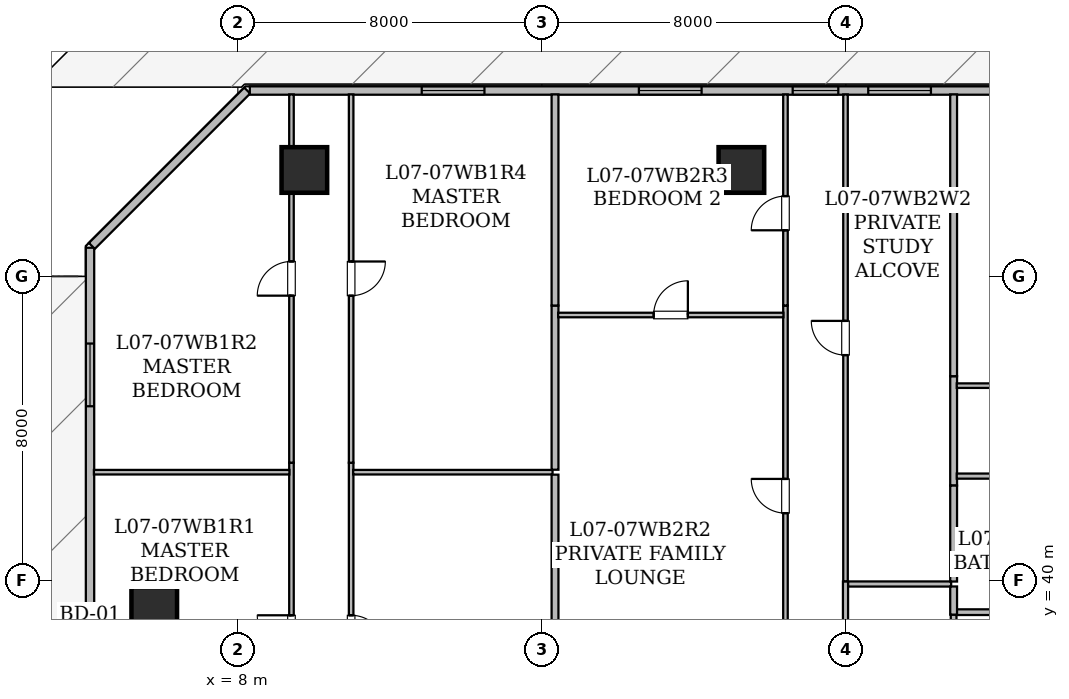
"""IFC4 building model, lengths in metres.
Left out: names, types, materials, properties, quantities, classifications, styles, units other than length and angle.
Written with IfcOpenShell. Run it as: python <this file> out.ifc"""

import sys

from ifc_helpers import new_model, si_unit, direction, frame, frame_2d, origin, origin_2d, place, context, subcontext, project, spatial, rectangle, hollow_rectangle, extrude, element, fill, save


model = new_model("IFC4")
c1 = context("Model", 3, precision=1e-05, world=origin(), true_north=direction((0.0, 1.0)))
c2 = subcontext(c1, "Body", "Model", "MODEL_VIEW")
j1 = project(units=[si_unit("LENGTHUNIT", "METRE"), si_unit("PLANEANGLEUNIT", "RADIAN")], contexts=[c1])
p1 = place(None, origin())
s1 = spatial("IfcSite", under=j1, at=p1, CompositionType="ELEMENT")
p2 = place(p1, origin())
s2 = spatial("IfcBuilding", under=s1, at=p2, CompositionType="ELEMENT")
p3 = place(p2, frame((0.0, 0.0, 33.3)))
s3 = spatial("IfcBuildingStorey", under=s2, at=p3, CompositionType="ELEMENT", Elevation=33.3)
for number, where, z_axis, x_axis in (
    (1, (9.75, 50.8, 0.025), (0.0, 0.0, 1.0), (1.0, 0.0, 0.0)),
    (2, (21.25, 50.8, 0.025), (0.0, 0.0, 1.0), (1.0, 0.0, 0.0)),
    (3, (5.8, 39.225, 0.025), (0.0, 0.0, 1.0), (1.0, 0.0, 0.0)),
):
    element("IfcColumn", number, at=place(p3, frame(where, z_axis=z_axis, x_axis=x_axis)), inside=s3, PredefinedType="COLUMN", context=c2, shape_type="SweptSolid", body=[
        extrude(hollow_rectangle(XDim=1.2, YDim=1.2, WallThickness=0.06, at=origin_2d()), origin(), (0.0, 0.0, 1.0), 3.625),
    ])
p4 = place(p3, frame((4.11, 31.295, 0.0), z_axis=(0.0, 0.0, 1.0), x_axis=(0.0, 1.0, 0.0)))
e4 = element("IfcWall", 4, at=p4, inside=s3, PredefinedType="STANDARD", context=c2, shape_type="SweptSolid", body=[
    extrude(rectangle(XDim=17.459, YDim=0.22, at=frame_2d((8.729, 0.0))), origin(), (0.0, 0.0, 1.0), 3.43),
])
p5 = place(p4, frame((5.203, 0.0, 0.0)))
e5 = element("IfcOpeningElement", 5, at=p5, cuts=e4, PredefinedType="OPENING", context=c2, shape_type="SweptSolid", body=[
    extrude(rectangle(XDim=1.1, YDim=2.2, at=frame_2d((0.55, 1.1))), frame((0.0, 0.12, 0.0), z_axis=(0.0, -1.0, 0.0), x_axis=(1.0, 0.0, 0.0)), (0.0, 0.0, 1.0), 0.24),
])
p6 = place(p4, frame((1.058, 0.0, 0.85)))
e6 = element("IfcOpeningElement", 6, at=p6, cuts=e4, PredefinedType="OPENING", context=c2, shape_type="SweptSolid", body=[
    extrude(rectangle(XDim=1.65, YDim=1.55, at=frame_2d((0.825, 0.775))), frame((0.0, 0.12, 0.0), z_axis=(0.0, -1.0, 0.0), x_axis=(1.0, 0.0, 0.0)), (0.0, 0.0, 1.0), 0.24),
])
p7 = place(p4, frame((13.288, 0.0, 0.85)))
e7 = element("IfcOpeningElement", 7, at=p7, cuts=e4, PredefinedType="OPENING", context=c2, shape_type="SweptSolid", body=[
    extrude(rectangle(XDim=1.65, YDim=1.55, at=frame_2d((0.825, 0.775))), frame((0.0, 0.12, 0.0), z_axis=(0.0, -1.0, 0.0), x_axis=(1.0, 0.0, 0.0)), (0.0, 0.0, 1.0), 0.24),
])
p8 = place(p3, frame((4.158, 48.802, 0.0), z_axis=(0.0, 0.0, 1.0), x_axis=(0.70712789547, 0.707085666273, 0.0)))
e8 = element("IfcWall", 8, at=p8, inside=s3, PredefinedType="STANDARD", context=c2, shape_type="SweptSolid", body=[
    extrude(rectangle(XDim=5.781, YDim=0.22, at=frame_2d((2.891, 0.0))), origin(), (0.0, 0.0, 1.0), 3.43),
])
p9 = place(p3, frame((8.315, 52.89, 0.0), z_axis=(0.0, 0.0, 1.0), x_axis=(1.0, 0.0, 0.0)))
e9 = element("IfcWall", 9, at=p9, inside=s3, PredefinedType="STANDARD", context=c2, shape_type="SweptSolid", body=[
    extrude(rectangle(XDim=37.439, YDim=0.22, at=frame_2d((18.719, 0.0))), origin(), (0.0, 0.0, 1.0), 3.43),
])
p10 = place(p9, frame((19.779, 0.0, 0.0)))
e10 = element("IfcOpeningElement", 10, at=p10, cuts=e9, PredefinedType="OPENING", context=c2, shape_type="SweptSolid", body=[
    extrude(rectangle(XDim=1.0, YDim=2.15, at=frame_2d((0.5, 1.075))), frame((0.0, 0.12, 0.0), z_axis=(0.0, -1.0, 0.0), x_axis=(1.0, 0.0, 0.0)), (0.0, 0.0, 1.0), 0.24),
])
p11 = place(p9, frame((4.524, 0.0, 0.85)))
e11 = element("IfcOpeningElement", 11, at=p11, cuts=e9, PredefinedType="OPENING", context=c2, shape_type="SweptSolid", body=[
    extrude(rectangle(XDim=1.65, YDim=1.55, at=frame_2d((0.825, 0.775))), frame((0.0, 0.12, 0.0), z_axis=(0.0, -1.0, 0.0), x_axis=(1.0, 0.0, 0.0)), (0.0, 0.0, 1.0), 0.24),
])
p12 = place(p9, frame((16.273, 0.0, 0.85)))
e12 = element("IfcOpeningElement", 12, at=p12, cuts=e9, PredefinedType="OPENING", context=c2, shape_type="SweptSolid", body=[
    extrude(rectangle(XDim=1.65, YDim=1.55, at=frame_2d((0.825, 0.775))), frame((0.0, 0.12, 0.0), z_axis=(0.0, -1.0, 0.0), x_axis=(1.0, 0.0, 0.0)), (0.0, 0.0, 1.0), 0.24),
])
p13 = place(p9, frame((14.285, 0.0, 0.8)))
e13 = element("IfcOpeningElement", 13, at=p13, cuts=e9, PredefinedType="OPENING", context=c2, shape_type="SweptSolid", body=[
    extrude(rectangle(XDim=1.2, YDim=1.5, at=frame_2d((0.6, 0.75))), frame((0.0, 0.12, 0.0), z_axis=(0.0, -1.0, 0.0), x_axis=(1.0, 0.0, 0.0)), (0.0, 0.0, 1.0), 0.24),
])
p14 = place(p9, frame((10.238, 0.0, 0.85)))
e14 = element("IfcOpeningElement", 14, at=p14, cuts=e9, PredefinedType="OPENING", context=c2, shape_type="SweptSolid", body=[
    extrude(rectangle(XDim=1.65, YDim=1.55, at=frame_2d((0.825, 0.775))), frame((0.0, 0.12, 0.0), z_axis=(0.0, -1.0, 0.0), x_axis=(1.0, 0.0, 0.0)), (0.0, 0.0, 1.0), 0.24),
])
p15 = place(p9, frame((25.185, 0.0, 0.8)))
e15 = element("IfcOpeningElement", 15, at=p15, cuts=e9, PredefinedType="OPENING", context=c2, shape_type="SweptSolid", body=[
    extrude(rectangle(XDim=1.2, YDim=1.5, at=frame_2d((0.6, 0.75))), frame((0.0, 0.12, 0.0), z_axis=(0.0, -1.0, 0.0), x_axis=(1.0, 0.0, 0.0)), (0.0, 0.0, 1.0), 0.24),
])
p16 = place(p9, frame((28.985, 0.0, 0.85)))
e16 = element("IfcOpeningElement", 16, at=p16, cuts=e9, PredefinedType="OPENING", context=c2, shape_type="SweptSolid", body=[
    extrude(rectangle(XDim=1.65, YDim=1.55, at=frame_2d((0.825, 0.775))), frame((0.0, 0.12, 0.0), z_axis=(0.0, -1.0, 0.0), x_axis=(1.0, 0.0, 0.0)), (0.0, 0.0, 1.0), 0.24),
])
p17 = place(p9, frame((33.49, 0.0, 0.85)))
e17 = element("IfcOpeningElement", 17, at=p17, cuts=e9, PredefinedType="OPENING", context=c2, shape_type="SweptSolid", body=[
    extrude(rectangle(XDim=1.65, YDim=1.55, at=frame_2d((0.825, 0.775))), frame((0.0, 0.12, 0.0), z_axis=(0.0, -1.0, 0.0), x_axis=(1.0, 0.0, 0.0)), (0.0, 0.0, 1.0), 0.24),
])
p18 = place(p9, frame((35.942, 0.0, 0.85)))
e18 = element("IfcOpeningElement", 18, at=p18, cuts=e9, PredefinedType="OPENING", context=c2, shape_type="SweptSolid", body=[
    extrude(rectangle(XDim=1.35, YDim=1.5, at=frame_2d((0.675, 0.75))), frame((0.0, 0.12, 0.0), z_axis=(0.0, -1.0, 0.0), x_axis=(1.0, 0.0, 0.0)), (0.0, 0.0, 1.0), 0.24),
])
p19 = place(p3, frame((26.835, 35.19, 0.0), z_axis=(0.0, 0.0, 1.0), x_axis=(0.0, 1.0, 0.0)))
e19 = element("IfcWall", 19, at=p19, inside=s3, PredefinedType="STANDARD", context=c2, shape_type="SweptSolid", body=[
    extrude(rectangle(XDim=3.91, YDim=0.15, at=frame_2d((1.955, 0.0))), origin(), (0.0, 0.0, 1.0), 2.647),
])
p20 = place(p3, frame((26.9, 39.165, 0.0), z_axis=(0.0, 0.0, 1.0), x_axis=(1.0, 0.0, 0.0)))
e20 = element("IfcWall", 20, at=p20, inside=s3, PredefinedType="STANDARD", context=c2, shape_type="SweptSolid", body=[
    extrude(rectangle(XDim=4.701, YDim=0.15, at=frame_2d((2.351, 0.0))), origin(), (0.0, 0.0, 1.0), 2.647),
])
p21 = place(p3, frame((9.411, 34.21, 0.0), z_axis=(0.0, 0.0, 1.0), x_axis=(0.0, 1.0, 0.0)))
e21 = element("IfcWall", 21, at=p21, inside=s3, PredefinedType="PARTITIONING", context=c2, shape_type="SweptSolid", body=[
    extrude(rectangle(XDim=8.887, YDim=0.12, at=frame_2d((4.443, 0.0))), origin(), (0.0, 0.0, 1.0), 2.647),
])
p22 = place(p21, frame((3.973, 0.0, 0.0)))
e22 = element("IfcOpeningElement", 22, at=p22, cuts=e21, PredefinedType="OPENING", context=c2, shape_type="SweptSolid", body=[
    extrude(rectangle(XDim=0.9, YDim=2.1, at=frame_2d((0.45, 1.05))), frame((0.0, 0.07, 0.0), z_axis=(0.0, -1.0, 0.0), x_axis=(1.0, 0.0, 0.0)), (0.0, 0.0, 1.0), 0.14),
])
p23 = place(p3, frame((9.411, 43.097, 0.0), z_axis=(0.0, 0.0, 1.0), x_axis=(0.0, 1.0, 0.0)))
e23 = element("IfcWall", 23, at=p23, inside=s3, PredefinedType="PARTITIONING", context=c2, shape_type="SweptSolid", body=[
    extrude(rectangle(XDim=9.691, YDim=0.12, at=frame_2d((4.846, 0.0))), origin(), (0.0, 0.0, 1.0), 2.647),
])
p24 = place(p23, frame((4.396, 0.0, 0.0)))
e24 = element("IfcOpeningElement", 24, at=p24, cuts=e23, PredefinedType="OPENING", context=c2, shape_type="SweptSolid", body=[
    extrude(rectangle(XDim=0.9, YDim=2.1, at=frame_2d((0.45, 1.05))), frame((0.0, 0.07, 0.0), z_axis=(0.0, -1.0, 0.0), x_axis=(1.0, 0.0, 0.0)), (0.0, 0.0, 1.0), 0.14),
])
p25 = place(p3, frame((10.981, 43.097, 0.0), z_axis=(0.0, 0.0, 1.0), x_axis=(0.0, -1.0, 0.0)))
e25 = element("IfcWall", 25, at=p25, inside=s3, PredefinedType="PARTITIONING", context=c2, shape_type="SweptSolid", body=[
    extrude(rectangle(XDim=8.887, YDim=0.12, at=frame_2d((4.443, 0.0))), origin(), (0.0, 0.0, 1.0), 2.647),
])
p26 = place(p25, frame((4.014, 0.0, 0.0)))
e26 = element("IfcOpeningElement", 26, at=p26, cuts=e25, PredefinedType="OPENING", context=c2, shape_type="SweptSolid", body=[
    extrude(rectangle(XDim=0.9, YDim=2.1, at=frame_2d((0.45, 1.05))), frame((0.0, 0.07, 0.0), z_axis=(0.0, -1.0, 0.0), x_axis=(1.0, 0.0, 0.0)), (0.0, 0.0, 1.0), 0.14),
])
p27 = place(p3, frame((10.981, 52.788, 0.0), z_axis=(0.0, 0.0, 1.0), x_axis=(0.0, -1.0, 0.0)))
e27 = element("IfcWall", 27, at=p27, inside=s3, PredefinedType="PARTITIONING", context=c2, shape_type="SweptSolid", body=[
    extrude(rectangle(XDim=9.691, YDim=0.12, at=frame_2d((4.846, 0.0))), origin(), (0.0, 0.0, 1.0), 2.647),
])
p28 = place(p27, frame((4.396, 0.0, 0.0)))
e28 = element("IfcOpeningElement", 28, at=p28, cuts=e27, PredefinedType="OPENING", context=c2, shape_type="SweptSolid", body=[
    extrude(rectangle(XDim=0.9, YDim=2.1, at=frame_2d((0.45, 1.05))), frame((0.0, 0.07, 0.0), z_axis=(0.0, -1.0, 0.0), x_axis=(1.0, 0.0, 0.0)), (0.0, 0.0, 1.0), 0.14),
])
p29 = place(p3, frame((4.212, 42.848, 0.0), z_axis=(0.0, 0.0, 1.0), x_axis=(1.0, 0.0, 0.0)))
e29 = element("IfcWall", 29, at=p29, inside=s3, PredefinedType="PARTITIONING", context=c2, shape_type="SweptSolid", body=[
    extrude(rectangle(XDim=5.145, YDim=0.12, at=frame_2d((2.573, 0.0))), origin(), (0.0, 0.0, 1.0), 2.803),
])
p30 = place(p3, frame((11.035, 42.848, 0.0), z_axis=(0.0, 0.0, 1.0), x_axis=(1.0, 0.0, 0.0)))
e30 = element("IfcWall", 30, at=p30, inside=s3, PredefinedType="PARTITIONING", context=c2, shape_type="SweptSolid", body=[
    extrude(rectangle(XDim=5.246, YDim=0.12, at=frame_2d((2.623, 0.0))), origin(), (0.0, 0.0, 1.0), 2.647),
])
p31 = place(p3, frame((16.346, 42.783, 0.0), z_axis=(0.0, 0.0, 1.0), x_axis=(0.0, -1.0, 0.0)))
e31 = element("IfcWall", 31, at=p31, inside=s3, PredefinedType="STANDARD", context=c2, shape_type="SweptSolid", body=[
    extrude(rectangle(XDim=5.531, YDim=0.18, at=frame_2d((2.766, 0.0))), origin(), (0.0, 0.0, 1.0), 2.647),
])
p32 = place(p3, frame((16.346, 47.233, 0.0), z_axis=(0.0, 0.0, 1.0), x_axis=(0.0, -1.0, 0.0)))
e32 = element("IfcWall", 32, at=p32, inside=s3, PredefinedType="STANDARD", context=c2, shape_type="SweptSolid", body=[
    extrude(rectangle(XDim=4.32, YDim=0.18, at=frame_2d((2.16, 0.0))), origin(), (0.0, 0.0, 1.0), 3.43),
])
p33 = place(p3, frame((16.346, 52.788, 0.0), z_axis=(0.0, 0.0, 1.0), x_axis=(0.0, -1.0, 0.0)))
e33 = element("IfcWall", 33, at=p33, inside=s3, PredefinedType="STANDARD", context=c2, shape_type="SweptSolid", body=[
    extrude(rectangle(XDim=5.555, YDim=0.18, at=frame_2d((2.778, 0.0))), origin(), (0.0, 0.0, 1.0), 2.803),
])
p34 = place(p3, frame((23.99, 39.971, 0.0), z_axis=(0.0, 0.0, 1.0), x_axis=(0.0, 1.0, 0.0)))
e34 = element("IfcWall", 34, at=p34, inside=s3, PredefinedType="PARTITIONING", context=c2, shape_type="SweptSolid", body=[
    extrude(rectangle(XDim=12.817, YDim=0.12, at=frame_2d((6.409, 0.0))), origin(), (0.0, 0.0, 1.0), 2.803),
])
p35 = place(p34, frame((5.958, 0.0, 0.0)))
e35 = element("IfcOpeningElement", 35, at=p35, cuts=e34, PredefinedType="OPENING", context=c2, shape_type="SweptSolid", body=[
    extrude(rectangle(XDim=0.9, YDim=2.1, at=frame_2d((0.45, 1.05))), frame((0.0, 0.07, 0.0), z_axis=(0.0, -1.0, 0.0), x_axis=(1.0, 0.0, 0.0)), (0.0, 0.0, 1.0), 0.14),
])
p36 = place(p3, frame((26.77, 39.906, 0.0), z_axis=(0.0, 0.0, 1.0), x_axis=(-1.0, 0.0, 0.0)))
e36 = element("IfcWall", 36, at=p36, inside=s3, PredefinedType="PARTITIONING", context=c2, shape_type="SweptSolid", body=[
    extrude(rectangle(XDim=2.715, YDim=0.135, at=frame_2d((1.357, 0.0))), origin(), (0.0, 0.0, 1.0), 3.43),
])
p37 = place(p3, frame((26.835, 45.374, 0.0), z_axis=(0.0, 0.0, 1.0), x_axis=(0.0, -1.0, 0.0)))
e37 = element("IfcWall", 37, at=p37, inside=s3, PredefinedType="STANDARD", context=c2, shape_type="SweptSolid", body=[
    extrude(rectangle(XDim=2.878, YDim=0.18, at=frame_2d((1.439, 0.0))), origin(), (0.0, 0.0, 1.0), 2.957),
])
p38 = place(p3, frame((26.835, 42.496, 0.0), z_axis=(0.0, 0.0, 1.0), x_axis=(0.0, -1.0, 0.0)))
e38 = element("IfcWall", 38, at=p38, inside=s3, PredefinedType="STANDARD", context=c2, shape_type="SweptSolid", body=[
    extrude(rectangle(XDim=2.525, YDim=0.18, at=frame_2d((1.263, 0.0))), origin(), (0.0, 0.0, 1.0), 2.957),
])
p39 = place(p3, frame((26.835, 52.788, 0.0), z_axis=(0.0, 0.0, 1.0), x_axis=(0.0, -1.0, 0.0)))
e39 = element("IfcWall", 39, at=p39, inside=s3, PredefinedType="STANDARD", context=c2, shape_type="SweptSolid", body=[
    extrude(rectangle(XDim=7.414, YDim=0.18, at=frame_2d((3.707, 0.0))), origin(), (0.0, 0.0, 1.0), 2.803),
])
p40 = place(p3, frame((23.99, 39.971, 0.0), z_axis=(0.0, 0.0, 1.0), x_axis=(0.0, -1.0, 0.0)))
e40 = element("IfcWall", 40, at=p40, inside=s3, PredefinedType="PARTITIONING", context=c2, shape_type="SweptSolid", body=[
    extrude(rectangle(XDim=5.095, YDim=0.135, at=frame_2d((2.547, 0.0))), origin(), (0.0, 0.0, 1.0), 2.647),
])
p41 = place(p40, frame((2.123, 0.0, 0.0)))
e41 = element("IfcOpeningElement", 41, at=p41, cuts=e40, PredefinedType="OPENING", context=c2, shape_type="SweptSolid", body=[
    extrude(rectangle(XDim=0.85, YDim=2.1, at=frame_2d((0.425, 1.05))), frame((0.0, 0.077, 0.0), z_axis=(0.0, -1.0, 0.0), x_axis=(1.0, 0.0, 0.0)), (0.0, 0.0, 1.0), 0.155),
])
p42 = place(p3, frame((22.41, 37.252, 0.0), z_axis=(0.0, 0.0, 1.0), x_axis=(0.0, 1.0, 0.0)))
e42 = element("IfcWall", 42, at=p42, inside=s3, PredefinedType="PARTITIONING", context=c2, shape_type="SweptSolid", body=[
    extrude(rectangle(XDim=9.981, YDim=0.12, at=frame_2d((4.99, 0.0))), origin(), (0.0, 0.0, 1.0), 2.647),
])
p43 = place(p42, frame((4.519, 0.0, 0.0)))
e43 = element("IfcOpeningElement", 43, at=p43, cuts=e42, PredefinedType="OPENING", context=c2, shape_type="SweptSolid", body=[
    extrude(rectangle(XDim=0.9, YDim=2.1, at=frame_2d((0.45, 1.05))), frame((0.0, 0.07, 0.0), z_axis=(0.0, -1.0, 0.0), x_axis=(1.0, 0.0, 0.0)), (0.0, 0.0, 1.0), 0.14),
])
p44 = place(p3, frame((22.41, 47.233, 0.0), z_axis=(0.0, 0.0, 1.0), x_axis=(0.0, 1.0, 0.0)))
e44 = element("IfcWall", 44, at=p44, inside=s3, PredefinedType="PARTITIONING", context=c2, shape_type="SweptSolid", body=[
    extrude(rectangle(XDim=5.555, YDim=0.12, at=frame_2d((2.778, 0.0))), origin(), (0.0, 0.0, 1.0), 2.803),
])
p45 = place(p44, frame((1.98, 0.0, 0.0)))
e45 = element("IfcOpeningElement", 45, at=p45, cuts=e44, PredefinedType="OPENING", context=c2, shape_type="SweptSolid", body=[
    extrude(rectangle(XDim=0.9, YDim=2.1, at=frame_2d((0.45, 1.05))), frame((0.0, 0.07, 0.0), z_axis=(0.0, -1.0, 0.0), x_axis=(1.0, 0.0, 0.0)), (0.0, 0.0, 1.0), 0.14),
])
p46 = place(p3, frame((26.835, 39.841, 0.0), z_axis=(0.0, 0.0, 1.0), x_axis=(0.0, -1.0, 0.0)))
e46 = element("IfcWall", 46, at=p46, inside=s3, PredefinedType="STANDARD", context=c2, shape_type="SweptSolid", body=[
    extrude(rectangle(XDim=0.741, YDim=0.18, at=frame_2d((0.371, 0.0))), origin(), (0.0, 0.0, 1.0), 3.43),
])
p47 = place(p3, frame((16.428, 46.984, 0.0), z_axis=(0.0, 0.0, 1.0), x_axis=(1.0, 0.0, 0.0)))
e47 = element("IfcWall", 47, at=p47, inside=s3, PredefinedType="PARTITIONING", context=c2, shape_type="SweptSolid", body=[
    extrude(rectangle(XDim=5.928, YDim=0.12, at=frame_2d((2.964, 0.0))), origin(), (0.0, 0.0, 1.0), 2.647),
])
p48 = place(p47, frame((2.514, 0.0, 0.0)))
e48 = element("IfcOpeningElement", 48, at=p48, cuts=e47, PredefinedType="OPENING", context=c2, shape_type="SweptSolid", body=[
    extrude(rectangle(XDim=0.9, YDim=2.1, at=frame_2d((0.45, 1.05))), frame((0.0, 0.07, 0.0), z_axis=(0.0, -1.0, 0.0), x_axis=(1.0, 0.0, 0.0)), (0.0, 0.0, 1.0), 0.14),
])
p49 = place(p3, frame((31.915, 42.745, 0.0), z_axis=(0.0, 0.0, 1.0), x_axis=(-1.0, 0.0, 0.0)))
e49 = element("IfcWall", 49, at=p49, inside=s3, PredefinedType="PARTITIONING", context=c2, shape_type="SweptSolid", body=[
    extrude(rectangle(XDim=4.998, YDim=0.135, at=frame_2d((2.499, 0.0))), origin(), (0.0, 0.0, 1.0), 2.647),
])
p50 = place(p49, frame((2.074, 0.0, 0.0)))
e50 = element("IfcOpeningElement", 50, at=p50, cuts=e49, PredefinedType="OPENING", context=c2, shape_type="SweptSolid", body=[
    extrude(rectangle(XDim=0.85, YDim=2.1, at=frame_2d((0.425, 1.05))), frame((0.0, 0.077, 0.0), z_axis=(0.0, -1.0, 0.0), x_axis=(1.0, 0.0, 0.0)), (0.0, 0.0, 1.0), 0.155),
])
p51 = place(p3, frame((26.917, 45.125, 0.0), z_axis=(0.0, 0.0, 1.0), x_axis=(1.0, 0.0, 0.0)))
e51 = element("IfcWall", 51, at=p51, inside=s3, PredefinedType="PARTITIONING", context=c2, shape_type="SweptSolid", body=[
    extrude(rectangle(XDim=6.463, YDim=0.12, at=frame_2d((3.231, 0.0))), origin(), (0.0, 0.0, 1.0), 2.647),
])
p52 = place(p7, origin())
e52 = element("IfcWindow", 52, at=p52, inside=s3, PartitioningType="SINGLE_PANEL", PredefinedType="WINDOW", context=c2, shape_type="SweptSolid", body=[
    extrude(rectangle(XDim=1.65, YDim=1.55, at=frame_2d((0.825, 0.775))), frame((0.0, 0.03, 0.0), z_axis=(0.0, -1.0, 0.0), x_axis=(1.0, 0.0, 0.0)), (0.0, 0.0, 1.0), 0.06),
])
fill(e7, e52)
p53 = place(p11, origin())
e53 = element("IfcWindow", 53, at=p53, inside=s3, PartitioningType="SINGLE_PANEL", PredefinedType="WINDOW", context=c2, shape_type="SweptSolid", body=[
    extrude(rectangle(XDim=1.65, YDim=1.55, at=frame_2d((0.825, 0.775))), frame((0.0, 0.03, 0.0), z_axis=(0.0, -1.0, 0.0), x_axis=(1.0, 0.0, 0.0)), (0.0, 0.0, 1.0), 0.06),
])
fill(e11, e53)
p54 = place(p12, origin())
e54 = element("IfcWindow", 54, at=p54, inside=s3, PartitioningType="SINGLE_PANEL", PredefinedType="WINDOW", context=c2, shape_type="SweptSolid", body=[
    extrude(rectangle(XDim=1.65, YDim=1.55, at=frame_2d((0.825, 0.775))), frame((0.0, 0.03, 0.0), z_axis=(0.0, -1.0, 0.0), x_axis=(1.0, 0.0, 0.0)), (0.0, 0.0, 1.0), 0.06),
])
fill(e12, e54)
p55 = place(p13, origin())
e55 = element("IfcWindow", 55, at=p55, inside=s3, PartitioningType="SINGLE_PANEL", PredefinedType="WINDOW", context=c2, shape_type="SweptSolid", body=[
    extrude(rectangle(XDim=1.2, YDim=1.5, at=frame_2d((0.6, 0.75))), frame((0.0, 0.03, 0.0), z_axis=(0.0, -1.0, 0.0), x_axis=(1.0, 0.0, 0.0)), (0.0, 0.0, 1.0), 0.06),
])
fill(e13, e55)
p56 = place(p14, origin())
e56 = element("IfcWindow", 56, at=p56, inside=s3, PartitioningType="SINGLE_PANEL", PredefinedType="WINDOW", context=c2, shape_type="SweptSolid", body=[
    extrude(rectangle(XDim=1.65, YDim=1.55, at=frame_2d((0.825, 0.775))), frame((0.0, 0.03, 0.0), z_axis=(0.0, -1.0, 0.0), x_axis=(1.0, 0.0, 0.0)), (0.0, 0.0, 1.0), 0.06),
])
fill(e14, e56)
p57 = place(p22, origin())
e57 = element("IfcDoor", 57, at=p57, inside=s3, OperationType="SINGLE_SWING_RIGHT", PredefinedType="DOOR", context=c2, shape_type="SweptSolid", body=[
    extrude(rectangle(XDim=0.9, YDim=2.1, at=frame_2d((0.45, 1.05))), frame((0.0, 0.025, 0.0), z_axis=(0.0, -1.0, 0.0), x_axis=(1.0, 0.0, 0.0)), (0.0, 0.0, 1.0), 0.05),
])
fill(e22, e57)
p58 = place(p24, origin())
e58 = element("IfcDoor", 58, at=p58, inside=s3, OperationType="SINGLE_SWING_LEFT", PredefinedType="DOOR", context=c2, shape_type="SweptSolid", body=[
    extrude(rectangle(XDim=0.9, YDim=2.1, at=frame_2d((0.45, 1.05))), frame((0.0, 0.025, 0.0), z_axis=(0.0, -1.0, 0.0), x_axis=(1.0, 0.0, 0.0)), (0.0, 0.0, 1.0), 0.05),
])
fill(e24, e58)
p59 = place(p26, origin())
e59 = element("IfcDoor", 59, at=p59, inside=s3, OperationType="SINGLE_SWING_RIGHT", PredefinedType="DOOR", context=c2, shape_type="SweptSolid", body=[
    extrude(rectangle(XDim=0.9, YDim=2.1, at=frame_2d((0.45, 1.05))), frame((0.0, 0.025, 0.0), z_axis=(0.0, -1.0, 0.0), x_axis=(1.0, 0.0, 0.0)), (0.0, 0.0, 1.0), 0.05),
])
fill(e26, e59)
p60 = place(p28, origin())
e60 = element("IfcDoor", 60, at=p60, inside=s3, OperationType="SINGLE_SWING_LEFT", PredefinedType="DOOR", context=c2, shape_type="SweptSolid", body=[
    extrude(rectangle(XDim=0.9, YDim=2.1, at=frame_2d((0.45, 1.05))), frame((0.0, 0.025, 0.0), z_axis=(0.0, -1.0, 0.0), x_axis=(1.0, 0.0, 0.0)), (0.0, 0.0, 1.0), 0.05),
])
fill(e28, e60)
p61 = place(p35, origin())
e61 = element("IfcDoor", 61, at=p61, inside=s3, OperationType="SINGLE_SWING_RIGHT", PredefinedType="DOOR", context=c2, shape_type="SweptSolid", body=[
    extrude(rectangle(XDim=0.9, YDim=2.1, at=frame_2d((0.45, 1.05))), frame((0.0, 0.025, 0.0), z_axis=(0.0, -1.0, 0.0), x_axis=(1.0, 0.0, 0.0)), (0.0, 0.0, 1.0), 0.05),
])
fill(e35, e61)
p62 = place(p43, origin())
e62 = element("IfcDoor", 62, at=p62, inside=s3, OperationType="SINGLE_SWING_RIGHT", PredefinedType="DOOR", context=c2, shape_type="SweptSolid", body=[
    extrude(rectangle(XDim=0.9, YDim=2.1, at=frame_2d((0.45, 1.05))), frame((0.0, 0.025, 0.0), z_axis=(0.0, -1.0, 0.0), x_axis=(1.0, 0.0, 0.0)), (0.0, 0.0, 1.0), 0.05),
])
fill(e43, e62)
p63 = place(p45, origin())
e63 = element("IfcDoor", 63, at=p63, inside=s3, OperationType="SINGLE_SWING_LEFT", PredefinedType="DOOR", context=c2, shape_type="SweptSolid", body=[
    extrude(rectangle(XDim=0.9, YDim=2.1, at=frame_2d((0.45, 1.05))), frame((0.0, 0.025, 0.0), z_axis=(0.0, -1.0, 0.0), x_axis=(1.0, 0.0, 0.0)), (0.0, 0.0, 1.0), 0.05),
])
fill(e45, e63)
p64 = place(p48, origin())
e64 = element("IfcDoor", 64, at=p64, inside=s3, OperationType="SINGLE_SWING_RIGHT", PredefinedType="DOOR", context=c2, shape_type="SweptSolid", body=[
    extrude(rectangle(XDim=0.9, YDim=2.1, at=frame_2d((0.45, 1.05))), frame((0.0, 0.025, 0.0), z_axis=(0.0, -1.0, 0.0), x_axis=(1.0, 0.0, 0.0)), (0.0, 0.0, 1.0), 0.05),
])
fill(e48, e64)
save(model, sys.argv[1])
